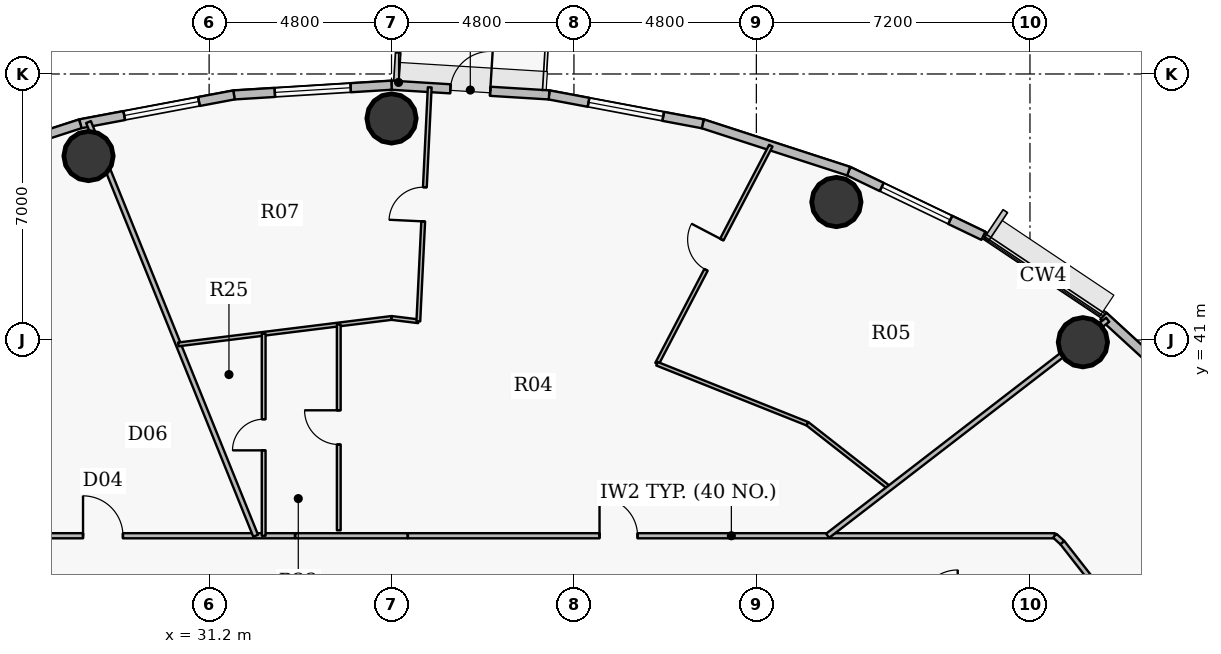
"""IFC4 building model, lengths in metres.
Left out: names, types, materials, properties, quantities, classifications, styles, units other than length and angle.
Written with IfcOpenShell. Run it as: python <this file> out.ifc"""

import sys

from ifc_helpers import new_model, si_unit, direction, frame, frame_2d, origin, origin_2d, place, context, subcontext, project, spatial, rectangle, hollow_circle, extrude, source, transform, mapped, element, fill, save


model = new_model("IFC4")
c1 = context("Model", 3, precision=1e-05, world=origin(), true_north=direction((0.0, 1.0)))
c2 = subcontext(c1, "Body", "Model", "MODEL_VIEW")
j1 = project(units=[si_unit("LENGTHUNIT", "METRE"), si_unit("PLANEANGLEUNIT", "RADIAN")], contexts=[c1])
p1 = place(None, origin())
s1 = spatial("IfcSite", under=j1, at=p1, CompositionType="ELEMENT")
p2 = place(p1, origin())
s2 = spatial("IfcBuilding", under=s1, at=p2, CompositionType="ELEMENT")
p3 = place(p2, frame((0.0, 0.0, 186.15)))
s3 = spatial("IfcBuildingStorey", under=s2, at=p3, CompositionType="ELEMENT", Elevation=186.15)
for number, where, z_axis, x_axis in (
    (1, (54.192, 40.942, 0.0), (0.0, 0.0, 1.0), (1.0, 0.0, 0.0)),
    (2, (47.706, 44.631, 0.0), (0.0, 0.0, 1.0), (1.0, 0.0, 0.0)),
    (3, (36.0, 46.83, 0.0), (0.0, 0.0, 1.0), (1.0, 0.0, 0.0)),
    (4, (28.027, 45.841, 0.0), (0.0, 0.0, 1.0), (1.0, 0.0, 0.0)),
):
    element("IfcColumn", number, at=place(p3, frame(where, z_axis=z_axis, x_axis=x_axis)), inside=s3, PredefinedType="COLUMN", context=c2, shape_type="SweptSolid", body=[
        extrude(hollow_circle(Radius=0.65, WallThickness=0.04, at=origin_2d()), origin(), (0.0, 0.0, 1.0), 3.75),
    ])
p4 = place(p3, frame((54.732, 41.631, 0.0), z_axis=(0.0, 0.0, 1.0), x_axis=(0.737076565834, -0.675809245349, 0.0)))
e5 = element("IfcWall", 5, at=p4, inside=s3, PredefinedType="SOLIDWALL", context=c2, shape_type="SweptSolid", body=[
    extrude(rectangle(XDim=3.658, YDim=0.24, at=frame_2d((1.829, 0.0))), origin(), (0.0, 0.0, 1.0), 3.5),
])
p5 = place(p3, frame((48.03, 45.444, 0.0), z_axis=(0.0, 0.0, 1.0), x_axis=(0.901564733809, -0.432644231155, 0.0)))
e6 = element("IfcWall", 6, at=p5, inside=s3, PredefinedType="SOLIDWALL", context=c2, shape_type="SweptSolid", body=[
    extrude(rectangle(XDim=3.93, YDim=0.24, at=frame_2d((1.965, 0.0))), origin(), (0.0, 0.0, 1.0), 3.5),
])
p6 = place(p5, frame((0.965, 0.0, 0.9)))
e7 = element("IfcOpeningElement", 7, at=p6, cuts=e6, PredefinedType="OPENING", context=c2, shape_type="SweptSolid", body=[
    extrude(rectangle(XDim=2.0, YDim=1.75, at=origin_2d()), frame((1.0, 0.13, 0.875), z_axis=(0.0, -1.0, 0.0), x_axis=(1.0, 0.0, 0.0)), (0.0, 0.0, 1.0), 0.26),
])
p7 = place(p3, frame((44.189, 46.689, 0.0), z_axis=(0.0, 0.0, 1.0), x_axis=(0.951209870236, -0.30854462038, 0.0)))
e8 = element("IfcWall", 8, at=p7, inside=s3, PredefinedType="SOLIDWALL", context=c2, shape_type="SweptSolid", body=[
    extrude(rectangle(XDim=4.038, YDim=0.24, at=frame_2d((2.019, 0.0))), origin(), (0.0, 0.0, 1.0), 3.5),
])
p8 = place(p3, frame((40.146, 47.449, 0.0), z_axis=(0.0, 0.0, 1.0), x_axis=(0.982788108205, -0.184736391573, 0.0)))
e9 = element("IfcWall", 9, at=p8, inside=s3, PredefinedType="SOLIDWALL", context=c2, shape_type="SweptSolid", body=[
    extrude(rectangle(XDim=4.114, YDim=0.24, at=frame_2d((2.057, 0.0))), origin(), (0.0, 0.0, 1.0), 3.5),
])
p9 = place(p8, frame((1.057, 0.0, 0.9)))
e10 = element("IfcOpeningElement", 10, at=p9, cuts=e9, PredefinedType="OPENING", context=c2, shape_type="SweptSolid", body=[
    extrude(rectangle(XDim=2.0, YDim=1.75, at=origin_2d()), frame((1.0, 0.13, 0.875), z_axis=(0.0, -1.0, 0.0), x_axis=(1.0, 0.0, 0.0)), (0.0, 0.0, 1.0), 0.26),
])
p10 = place(p3, frame((36.0, 47.705, 0.0), z_axis=(0.0, 0.0, 1.0), x_axis=(0.998104600619, -0.061540281305, 0.0)))
e11 = element("IfcWall", 11, at=p10, inside=s3, PredefinedType="SOLIDWALL", context=c2, shape_type="SweptSolid", body=[
    extrude(rectangle(XDim=4.154, YDim=0.24, at=frame_2d((2.077, 0.0))), origin(), (0.0, 0.0, 1.0), 3.5),
])
p11 = place(p10, frame((1.552, 0.0, 0.0)))
e12 = element("IfcOpeningElement", 12, at=p11, cuts=e11, PredefinedType="OPENING", context=c2, shape_type="SweptSolid", body=[
    extrude(rectangle(XDim=1.05, YDim=2.15, at=origin_2d()), frame((0.525, 0.13, 1.075), z_axis=(0.0, -1.0, 0.0), x_axis=(1.0, 0.0, 0.0)), (0.0, 0.0, 1.0), 0.26),
])
p12 = place(p3, frame((31.854, 47.449, 0.0), z_axis=(0.0, 0.0, 1.0), x_axis=(0.998104600619, 0.061540281305, 0.0)))
e13 = element("IfcWall", 13, at=p12, inside=s3, PredefinedType="SOLIDWALL", context=c2, shape_type="SweptSolid", body=[
    extrude(rectangle(XDim=4.154, YDim=0.24, at=frame_2d((2.077, 0.0))), origin(), (0.0, 0.0, 1.0), 3.5),
])
p13 = place(p12, frame((1.077, 0.0, 0.9)))
e14 = element("IfcOpeningElement", 14, at=p13, cuts=e13, PredefinedType="OPENING", context=c2, shape_type="SweptSolid", body=[
    extrude(rectangle(XDim=2.0, YDim=1.75, at=origin_2d()), frame((1.0, 0.13, 0.875), z_axis=(0.0, -1.0, 0.0), x_axis=(1.0, 0.0, 0.0)), (0.0, 0.0, 1.0), 0.26),
])
p14 = place(p3, frame((27.811, 46.689, 0.0), z_axis=(0.0, 0.0, 1.0), x_axis=(0.982788108205, 0.184736391573, 0.0)))
e15 = element("IfcWall", 15, at=p14, inside=s3, PredefinedType="SOLIDWALL", context=c2, shape_type="SweptSolid", body=[
    extrude(rectangle(XDim=4.114, YDim=0.24, at=frame_2d((2.057, 0.0))), origin(), (0.0, 0.0, 1.0), 3.5),
])
p15 = place(p14, frame((1.176, 0.0, 0.9)))
e16 = element("IfcOpeningElement", 16, at=p15, cuts=e15, PredefinedType="OPENING", context=c2, shape_type="SweptSolid", body=[
    extrude(rectangle(XDim=2.0, YDim=1.75, at=origin_2d()), frame((1.0, 0.13, 0.875), z_axis=(0.0, -1.0, 0.0), x_axis=(1.0, 0.0, 0.0)), (0.0, 0.0, 1.0), 0.26),
])
p16 = place(p3, frame((23.97, 45.444, 0.0), z_axis=(0.0, 0.0, 1.0), x_axis=(0.951209870236, 0.30854462038, 0.0)))
e17 = element("IfcWall", 17, at=p16, inside=s3, PredefinedType="SOLIDWALL", context=c2, shape_type="SweptSolid", body=[
    extrude(rectangle(XDim=4.038, YDim=0.24, at=frame_2d((2.019, 0.0))), origin(), (0.0, 0.0, 1.0), 3.5),
])
p17 = place(p16, frame((1.019, 0.0, 0.9)))
e18 = element("IfcOpeningElement", 18, at=p17, cuts=e17, PredefinedType="OPENING", context=c2, shape_type="SweptSolid", body=[
    extrude(rectangle(XDim=2.0, YDim=1.75, at=origin_2d()), frame((1.0, 0.13, 0.875), z_axis=(0.0, -1.0, 0.0), x_axis=(1.0, 0.0, 0.0)), (0.0, 0.0, 1.0), 0.26),
])
p18 = place(p3, frame((24.35, 35.85, 0.0), z_axis=(0.0, 0.0, 1.0), x_axis=(1.0, 0.0, 0.0)))
e19 = element("IfcWall", 19, at=p18, inside=s3, PredefinedType="PARTITIONING", context=c2, shape_type="SweptSolid", body=[
    extrude(rectangle(XDim=9.109, YDim=0.135, at=frame_2d((4.554, 0.0))), origin(), (0.0, 0.0, 1.0), 2.935),
])
p19 = place(p18, frame((3.532, 0.0, 0.0)))
e20 = element("IfcOpeningElement", 20, at=p19, cuts=e19, PredefinedType="OPENING", context=c2, shape_type="SweptSolid", body=[
    extrude(rectangle(XDim=1.05, YDim=2.15, at=origin_2d()), frame((0.525, 0.078, 1.075), z_axis=(0.0, -1.0, 0.0), x_axis=(1.0, 0.0, 0.0)), (0.0, 0.0, 1.0), 0.155),
])
p20 = place(p3, frame((28.027, 46.735, 0.0), z_axis=(0.0, 0.0, 1.0), x_axis=(0.374604711709, -0.927184614824, 0.0)))
e21 = element("IfcWall", 21, at=p20, inside=s3, PredefinedType="PARTITIONING", context=c2, shape_type="SweptSolid", body=[
    extrude(rectangle(XDim=11.74, YDim=0.135, at=frame_2d((5.87, 0.0))), origin(), (0.0, 0.0, 1.0), 2.935),
])
p21 = place(p3, frame((30.39, 40.885, 0.0), z_axis=(0.0, 0.0, 1.0), x_axis=(0.992397005414, 0.123077957591, 0.0)))
e22 = element("IfcWall", 22, at=p21, inside=s3, PredefinedType="PARTITIONING", context=c2, shape_type="SweptSolid", body=[
    extrude(rectangle(XDim=5.653, YDim=0.1, at=frame_2d((2.827, 0.0))), origin(), (0.0, 0.0, 1.0), 2.935),
])
p22 = place(p3, frame((32.636, 35.85, 0.0), z_axis=(0.0, 0.0, 1.0), x_axis=(0.0, 1.0, 0.0)))
e23 = element("IfcWall", 23, at=p22, inside=s3, PredefinedType="PARTITIONING", context=c2, shape_type="SweptSolid", body=[
    extrude(rectangle(XDim=5.314, YDim=0.1, at=frame_2d((2.657, 0.0))), origin(), (0.0, 0.0, 1.0), 3.125),
])
p23 = place(p22, frame((2.247, 0.0, 0.0)))
e24 = element("IfcOpeningElement", 24, at=p23, cuts=e23, PredefinedType="OPENING", context=c2, shape_type="SweptSolid", body=[
    extrude(rectangle(XDim=0.82, YDim=2.1, at=origin_2d()), frame((0.41, 0.06, 1.05), z_axis=(0.0, -1.0, 0.0), x_axis=(1.0, 0.0, 0.0)), (0.0, 0.0, 1.0), 0.12),
])
p24 = place(p3, frame((34.612, 35.993, 0.0), z_axis=(0.0, 0.0, 1.0), x_axis=(0.0, 1.0, 0.0)))
e25 = element("IfcWall", 25, at=p24, inside=s3, PredefinedType="PARTITIONING", context=c2, shape_type="SweptSolid", body=[
    extrude(rectangle(XDim=5.416, YDim=0.1, at=frame_2d((2.708, 0.0))), origin(), (0.0, 0.0, 1.0), 3.125),
])
p25 = place(p24, frame((2.258, 0.0, 0.0)))
e26 = element("IfcOpeningElement", 26, at=p25, cuts=e25, PredefinedType="OPENING", context=c2, shape_type="SweptSolid", body=[
    extrude(rectangle(XDim=0.9, YDim=2.1, at=origin_2d()), frame((0.45, 0.06, 1.05), z_axis=(0.0, -1.0, 0.0), x_axis=(1.0, 0.0, 0.0)), (0.0, 0.0, 1.0), 0.12),
])
p26 = place(p3, frame((36.0, 41.581, 0.0), z_axis=(0.0, 0.0, 1.0), x_axis=(0.992372675388, -0.123273975939, 0.0)))
e27 = element("IfcWall", 27, at=p26, inside=s3, PredefinedType="PARTITIONING", context=c2, shape_type="SweptSolid", body=[
    extrude(rectangle(XDim=0.711, YDim=0.1, at=frame_2d((0.355, 0.0))), origin(), (0.0, 0.0, 1.0), 2.935),
])
p27 = place(p3, frame((36.431, 35.85, 0.0), z_axis=(0.0, 0.0, 1.0), x_axis=(1.0, 0.0, 0.0)))
e28 = element("IfcWall", 28, at=p27, inside=s3, PredefinedType="PARTITIONING", context=c2, shape_type="SweptSolid", body=[
    extrude(rectangle(XDim=17.023, YDim=0.135, at=frame_2d((8.511, 0.0))), origin(), (0.0, 0.0, 1.0), 2.935),
])
p28 = place(p27, frame((5.042, 0.0, 0.0)))
e29 = element("IfcOpeningElement", 29, at=p28, cuts=e28, PredefinedType="OPENING", context=c2, shape_type="SweptSolid", body=[
    extrude(rectangle(XDim=1.0, YDim=2.15, at=origin_2d()), frame((0.5, 0.078, 1.075), z_axis=(0.0, -1.0, 0.0), x_axis=(1.0, 0.0, 0.0)), (0.0, 0.0, 1.0), 0.155),
])
p29 = place(p3, frame((36.706, 41.493, 0.0), z_axis=(0.0, 0.0, 1.0), x_axis=(0.04865506791, 0.99881564083, 0.0)))
e30 = element("IfcWall", 30, at=p29, inside=s3, PredefinedType="PARTITIONING", context=c2, shape_type="SweptSolid", body=[
    extrude(rectangle(XDim=6.162, YDim=0.1, at=frame_2d((3.081, 0.0))), origin(), (0.0, 0.0, 1.0), 2.935),
])
p30 = place(p29, frame((2.631, 0.0, 0.0)))
e31 = element("IfcOpeningElement", 31, at=p30, cuts=e30, PredefinedType="OPENING", context=c2, shape_type="SweptSolid", body=[
    extrude(rectangle(XDim=0.9, YDim=2.1, at=origin_2d()), frame((0.45, 0.06, 1.05), z_axis=(0.0, -1.0, 0.0), x_axis=(1.0, 0.0, 0.0)), (0.0, 0.0, 1.0), 0.12),
])
p31 = place(p3, frame((42.985, 40.376, 0.0), z_axis=(0.0, 0.0, 1.0), x_axis=(0.462895979864, 0.886412608116, 0.0)))
e32 = element("IfcWall", 32, at=p31, inside=s3, PredefinedType="PARTITIONING", context=c2, shape_type="SweptSolid", body=[
    extrude(rectangle(XDim=6.472, YDim=0.1, at=frame_2d((3.236, 0.0))), origin(), (0.0, 0.0, 1.0), 2.935),
])
p32 = place(p31, frame((2.786, 0.0, 0.0)))
e33 = element("IfcOpeningElement", 33, at=p32, cuts=e32, PredefinedType="OPENING", context=c2, shape_type="SweptSolid", body=[
    extrude(rectangle(XDim=0.9, YDim=2.1, at=origin_2d()), frame((0.45, 0.06, 1.05), z_axis=(0.0, -1.0, 0.0), x_axis=(1.0, 0.0, 0.0)), (0.0, 0.0, 1.0), 0.12),
])
p33 = place(p3, frame((42.985, 40.376, 0.0), z_axis=(0.0, 0.0, 1.0), x_axis=(0.928808113019, -0.370561046509, 0.0)))
e34 = element("IfcWall", 34, at=p33, inside=s3, PredefinedType="PARTITIONING", context=c2, shape_type="SweptSolid", body=[
    extrude(rectangle(XDim=4.263, YDim=0.1, at=frame_2d((2.131, 0.0))), origin(), (0.0, 0.0, 1.0), 2.935),
])
p34 = place(p3, frame((46.945, 38.796, 0.0), z_axis=(0.0, 0.0, 1.0), x_axis=(0.787296465136, -0.616574631317, 0.0)))
e35 = element("IfcWall", 35, at=p34, inside=s3, PredefinedType="PARTITIONING", context=c2, shape_type="SweptSolid", body=[
    extrude(rectangle(XDim=2.743, YDim=0.1, at=frame_2d((1.372, 0.0))), origin(), (0.0, 0.0, 1.0), 2.935),
])
p35 = place(p3, frame((47.476, 35.85, 0.0), z_axis=(0.0, 0.0, 1.0), x_axis=(0.791888091101, 0.610666235495, 0.0)))
e36 = element("IfcWall", 36, at=p35, inside=s3, PredefinedType="PARTITIONING", context=c2, shape_type="SweptSolid", body=[
    extrude(rectangle(XDim=9.306, YDim=0.135, at=frame_2d((4.653, 0.0))), origin(), (0.0, 0.0, 1.0), 2.935),
])
p36 = place(p3, frame((53.454, 35.85, 0.0), z_axis=(0.0, 0.0, 1.0), x_axis=(0.736667385572, -0.676255249913, 0.0)))
e37 = element("IfcWall", 37, at=p36, inside=s3, PredefinedType="PARTITIONING", context=c2, shape_type="SweptSolid", body=[
    extrude(rectangle(XDim=0.271, YDim=0.135, at=frame_2d((0.135, 0.0))), origin(), (0.0, 0.0, 1.0), 3.5),
])
p37 = place(p3, frame((53.653, 35.667, 0.0), z_axis=(0.0, 0.0, 1.0), x_axis=(0.616302223209, -0.787509726713, 0.0)))
e38 = element("IfcWall", 38, at=p37, inside=s3, PredefinedType="PARTITIONING", context=c2, shape_type="SweptSolid", body=[
    extrude(rectangle(XDim=2.18, YDim=0.135, at=frame_2d((1.09, 0.0))), origin(), (0.0, 0.0, 1.0), 3.5),
])
p38 = place(p3, frame((33.469, 35.85, 0.0), z_axis=(0.0, 0.0, 1.0), x_axis=(1.0, 0.0, 0.0)))
e39 = element("IfcWall", 39, at=p38, inside=s3, PredefinedType="PARTITIONING", context=c2, shape_type="SweptSolid", body=[
    extrude(rectangle(XDim=2.952, YDim=0.135, at=frame_2d((1.476, 0.0))), origin(), (0.0, 0.0, 1.0), 2.935),
])
m1 = source(origin(), c2, "Body", "SweptSolid", [
    extrude(rectangle(XDim=2.0, YDim=1.75, at=origin_2d()), frame((1.0, 0.03, 0.875), z_axis=(0.0, -1.0, 0.0), x_axis=(1.0, 0.0, 0.0)), (0.0, 0.0, 1.0), 0.06),
])
p39 = place(p6, origin())
e40 = element("IfcWindow", 40, at=p39, inside=s3, PartitioningType="DOUBLE_PANEL_VERTICAL", PredefinedType="WINDOW", context=c2, shape_type="MappedRepresentation", body=[
    mapped(m1, transform((0.0, 0.0, 0.0), x_axis=(1.0, 0.0, 0.0), y_axis=(0.0, 1.0, 0.0), z_axis=(0.0, 0.0, 1.0), scale=1.0)),
])
fill(e7, e40)
p40 = place(p9, origin())
e41 = element("IfcWindow", 41, at=p40, inside=s3, PartitioningType="DOUBLE_PANEL_VERTICAL", PredefinedType="WINDOW", context=c2, shape_type="MappedRepresentation", body=[
    mapped(m1, transform((0.0, 0.0, 0.0), x_axis=(1.0, 0.0, 0.0), y_axis=(0.0, 1.0, 0.0), z_axis=(0.0, 0.0, 1.0), scale=1.0)),
])
fill(e10, e41)
m2 = source(origin(), c2, "Body", "SweptSolid", [
    extrude(rectangle(XDim=1.05, YDim=2.15, at=origin_2d()), frame((0.525, 0.025, 1.075), z_axis=(0.0, -1.0, 0.0), x_axis=(1.0, 0.0, 0.0)), (0.0, 0.0, 1.0), 0.05),
])
p41 = place(p11, origin())
e42 = element("IfcDoor", 42, at=p41, inside=s3, OperationType="SINGLE_SWING_RIGHT", PredefinedType="DOOR", context=c2, shape_type="MappedRepresentation", body=[
    mapped(m2, transform((0.0, 0.0, 0.0), x_axis=(1.0, 0.0, 0.0), y_axis=(0.0, 1.0, 0.0), z_axis=(0.0, 0.0, 1.0), scale=1.0)),
])
fill(e12, e42)
p42 = place(p13, origin())
e43 = element("IfcWindow", 43, at=p42, inside=s3, PartitioningType="DOUBLE_PANEL_VERTICAL", PredefinedType="WINDOW", context=c2, shape_type="MappedRepresentation", body=[
    mapped(m1, transform((0.0, 0.0, 0.0), x_axis=(1.0, 0.0, 0.0), y_axis=(0.0, 1.0, 0.0), z_axis=(0.0, 0.0, 1.0), scale=1.0)),
])
fill(e14, e43)
p43 = place(p15, origin())
e44 = element("IfcWindow", 44, at=p43, inside=s3, PartitioningType="DOUBLE_PANEL_VERTICAL", PredefinedType="WINDOW", context=c2, shape_type="MappedRepresentation", body=[
    mapped(m1, transform((0.0, 0.0, 0.0), x_axis=(1.0, 0.0, 0.0), y_axis=(0.0, 1.0, 0.0), z_axis=(0.0, 0.0, 1.0), scale=1.0)),
])
fill(e16, e44)
m3 = source(origin(), c2, "Body", "SweptSolid", [
    extrude(rectangle(XDim=1.0, YDim=2.15, at=origin_2d()), frame((0.5, 0.025, 1.075), z_axis=(0.0, -1.0, 0.0), x_axis=(1.0, 0.0, 0.0)), (0.0, 0.0, 1.0), 0.05),
])
p44 = place(p28, origin())
e45 = element("IfcDoor", 45, at=p44, inside=s3, OperationType="SINGLE_SWING_LEFT", PredefinedType="DOOR", context=c2, shape_type="MappedRepresentation", body=[
    mapped(m3, transform((0.0, 0.0, 0.0), x_axis=(1.0, 0.0, 0.0), y_axis=(0.0, 1.0, 0.0), z_axis=(0.0, 0.0, 1.0), scale=1.0)),
])
fill(e29, e45)
m4 = source(origin(), c2, "Body", "SweptSolid", [
    extrude(rectangle(XDim=0.9, YDim=2.1, at=origin_2d()), frame((0.45, 0.025, 1.05), z_axis=(0.0, -1.0, 0.0), x_axis=(1.0, 0.0, 0.0)), (0.0, 0.0, 1.0), 0.05),
])
p45 = place(p32, origin())
e46 = element("IfcDoor", 46, at=p45, inside=s3, OperationType="SINGLE_SWING_RIGHT", PredefinedType="DOOR", context=c2, shape_type="MappedRepresentation", body=[
    mapped(m4, transform((0.0, 0.0, 0.0), x_axis=(1.0, 0.0, 0.0), y_axis=(0.0, 1.0, 0.0), z_axis=(0.0, 0.0, 1.0), scale=1.0)),
])
fill(e33, e46)
p46 = place(p30, origin())
e47 = element("IfcDoor", 47, at=p46, inside=s3, OperationType="SINGLE_SWING_LEFT", PredefinedType="DOOR", context=c2, shape_type="MappedRepresentation", body=[
    mapped(m4, transform((0.0, 0.0, 0.0), x_axis=(1.0, 0.0, 0.0), y_axis=(0.0, 1.0, 0.0), z_axis=(0.0, 0.0, 1.0), scale=1.0)),
])
fill(e31, e47)
p47 = place(p25, origin())
e48 = element("IfcDoor", 48, at=p47, inside=s3, OperationType="SINGLE_SWING_RIGHT", PredefinedType="DOOR", context=c2, shape_type="MappedRepresentation", body=[
    mapped(m4, transform((0.0, 0.0, 0.0), x_axis=(1.0, 0.0, 0.0), y_axis=(0.0, 1.0, 0.0), z_axis=(0.0, 0.0, 1.0), scale=1.0)),
])
fill(e26, e48)
m5 = source(origin(), c2, "Body", "SweptSolid", [
    extrude(rectangle(XDim=0.82, YDim=2.1, at=origin_2d()), frame((0.41, 0.025, 1.05), z_axis=(0.0, -1.0, 0.0), x_axis=(1.0, 0.0, 0.0)), (0.0, 0.0, 1.0), 0.05),
])
p48 = place(p23, origin())
e49 = element("IfcDoor", 49, at=p48, inside=s3, OperationType="SINGLE_SWING_LEFT", PredefinedType="DOOR", context=c2, shape_type="MappedRepresentation", body=[
    mapped(m5, transform((0.0, 0.0, 0.0), x_axis=(1.0, 0.0, 0.0), y_axis=(0.0, 1.0, 0.0), z_axis=(0.0, 0.0, 1.0), scale=1.0)),
])
fill(e24, e49)
p49 = place(p19, origin())
e50 = element("IfcDoor", 50, at=p49, inside=s3, OperationType="SINGLE_SWING_LEFT", PredefinedType="DOOR", context=c2, shape_type="MappedRepresentation", body=[
    mapped(m2, transform((0.0, 0.0, 0.0), x_axis=(1.0, 0.0, 0.0), y_axis=(0.0, 1.0, 0.0), z_axis=(0.0, 0.0, 1.0), scale=1.0)),
])
fill(e20, e50)
save(model, sys.argv[1])
